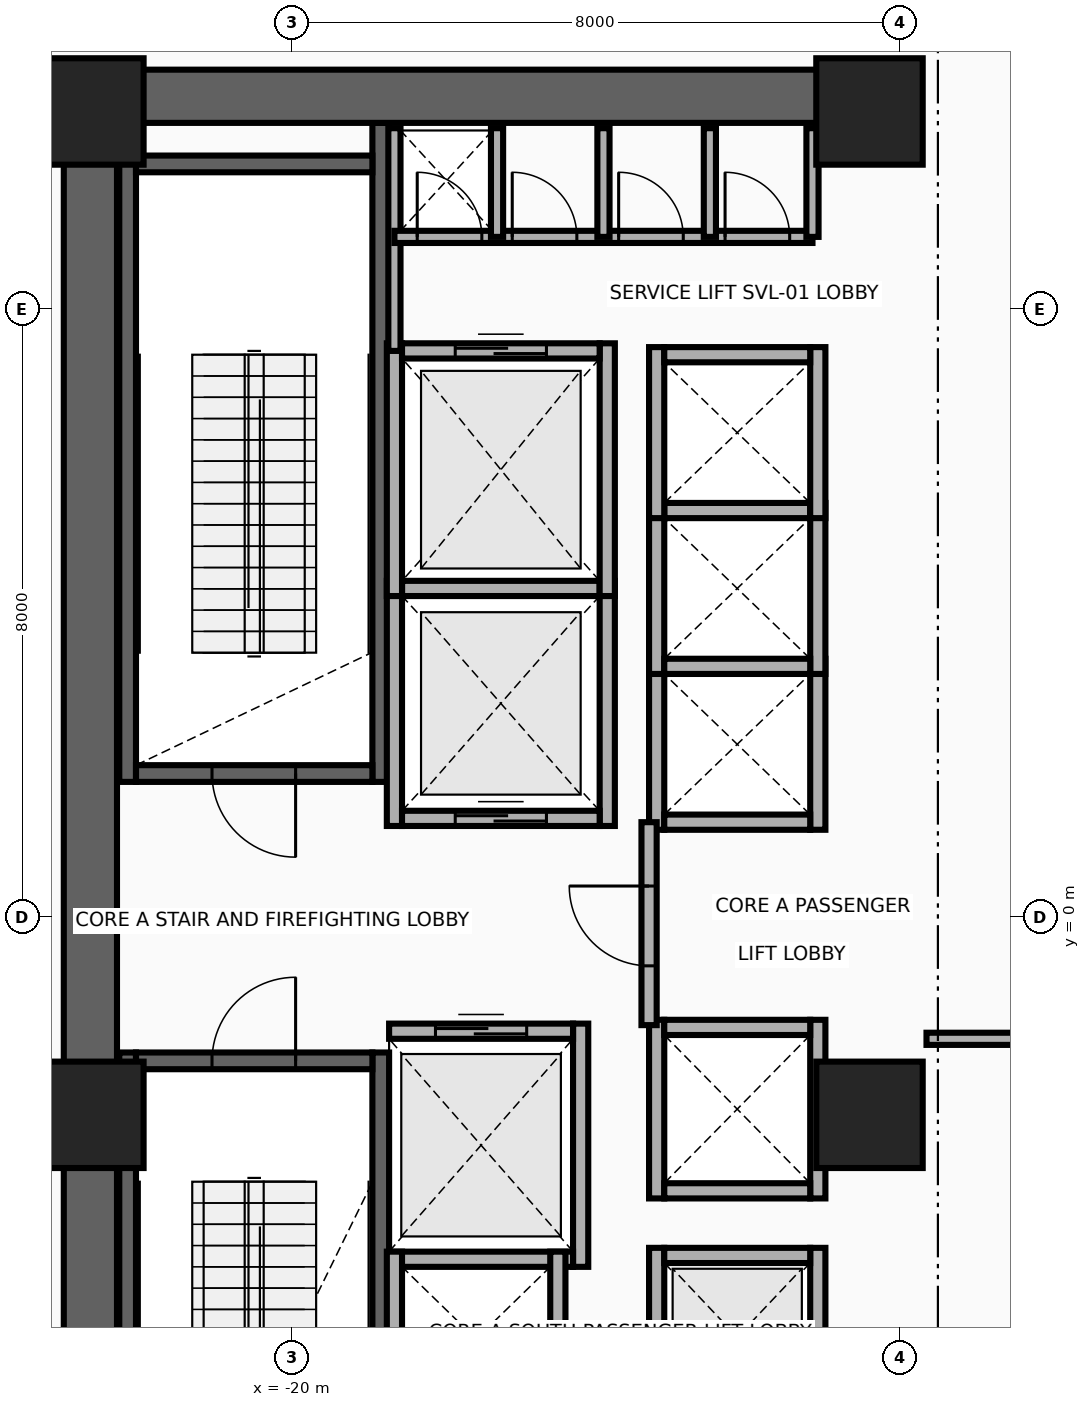
"""IFC4 building model, lengths in metres.
Left out: names, types, materials, properties, quantities, classifications, styles, units other than length and angle.
Written with IfcOpenShell. Run it as: python <this file> out.ifc"""

import sys

from ifc_helpers import new_model, si_unit, direction, frame, frame_2d, origin, origin_2d, place, context, subcontext, project, spatial, rectangle, extrude, source, transform, mapped, element, fill, save


model = new_model("IFC4")
c1 = context("Model", 3, precision=1e-05, world=origin(), true_north=direction((0.0, 1.0)))
c2 = subcontext(c1, "Body", "Model", "MODEL_VIEW")
j1 = project(units=[si_unit("LENGTHUNIT", "METRE"), si_unit("PLANEANGLEUNIT", "RADIAN")], contexts=[c1])
p1 = place(None, origin())
s1 = spatial("IfcSite", under=j1, at=p1, CompositionType="ELEMENT")
p2 = place(p1, origin())
s2 = spatial("IfcBuilding", under=s1, at=p2, CompositionType="ELEMENT")
p3 = place(p2, frame((0.0, 0.0, 15.6)))
s3 = spatial("IfcBuildingStorey", under=s2, at=p3, CompositionType="ELEMENT", Elevation=15.6)
for number, where, z_axis, x_axis in (
    (1, (-22.16, 1.78, 0.0), (0.0, 0.0, 1.0), (0.0, 1.0, 0.0)),
    (2, (-18.83, 1.78, 0.0), (0.0, 0.0, 1.0), (0.0, 1.0, 0.0)),
):
    element("IfcWall", number, at=place(p3, frame(where, z_axis=z_axis, x_axis=x_axis)), inside=s3, PredefinedType="SHEAR", context=c2, shape_type="SweptSolid", body=[
        extrude(rectangle(XDim=8.67, YDim=0.22, at=frame_2d((4.335, 0.0))), origin(), (0.0, 0.0, 1.0), 4.8),
    ])
p4 = place(p3, frame((-22.05, 1.89, 0.0), z_axis=(0.0, 0.0, 1.0), x_axis=(1.0, 0.0, 0.0)))
e3 = element("IfcWall", 3, at=p4, inside=s3, PredefinedType="SHEAR", context=c2, shape_type="SweptSolid", body=[
    extrude(rectangle(XDim=3.11, YDim=0.22, at=frame_2d((1.555, 0.0))), origin(), (0.0, 0.0, 1.0), 4.8),
])
p5 = place(p4, frame((1.0, 0.0, 0.0)))
e4 = element("IfcOpeningElement", 4, at=p5, cuts=e3, PredefinedType="OPENING", context=c2, shape_type="SweptSolid", body=[
    extrude(rectangle(XDim=1.1, YDim=2.15, at=frame_2d((0.55, 1.075))), frame((0.0, 0.125, 0.0), z_axis=(0.0, -1.0, 0.0), x_axis=(1.0, 0.0, 0.0)), (0.0, 0.0, 1.0), 0.25),
])
p6 = place(p3, frame((-22.05, 9.91, 0.0), z_axis=(0.0, 0.0, 1.0), x_axis=(1.0, 0.0, 0.0)))
e5 = element("IfcWall", 5, at=p6, inside=s3, PredefinedType="SHEAR", context=c2, shape_type="SweptSolid", body=[
    extrude(rectangle(XDim=3.11, YDim=0.22, at=frame_2d((1.555, 0.0))), origin(), (0.0, 0.0, 1.0), 4.8),
])
for number, where, z_axis, x_axis in (
    (6, (-22.16, -10.45, 0.0), (0.0, 0.0, 1.0), (0.0, 1.0, 0.0)),
    (7, (-18.83, -10.45, 0.0), (0.0, 0.0, 1.0), (0.0, 1.0, 0.0)),
):
    element("IfcWall", number, at=place(p3, frame(where, z_axis=z_axis, x_axis=x_axis)), inside=s3, PredefinedType="SHEAR", context=c2, shape_type="SweptSolid", body=[
        extrude(rectangle(XDim=8.67, YDim=0.22, at=frame_2d((4.335, 0.0))), origin(), (0.0, 0.0, 1.0), 4.8),
    ])
p7 = place(p3, frame((-22.05, -1.89, 0.0), z_axis=(0.0, 0.0, 1.0), x_axis=(1.0, 0.0, 0.0)))
e8 = element("IfcWall", 8, at=p7, inside=s3, PredefinedType="SHEAR", context=c2, shape_type="SweptSolid", body=[
    extrude(rectangle(XDim=3.11, YDim=0.22, at=frame_2d((1.555, 0.0))), origin(), (0.0, 0.0, 1.0), 4.8),
])
p8 = place(p7, frame((1.0, 0.0, 0.0)))
e9 = element("IfcOpeningElement", 9, at=p8, cuts=e8, PredefinedType="OPENING", context=c2, shape_type="SweptSolid", body=[
    extrude(rectangle(XDim=1.1, YDim=2.15, at=frame_2d((0.55, 1.075))), frame((0.0, 0.125, 0.0), z_axis=(0.0, -1.0, 0.0), x_axis=(1.0, 0.0, 0.0)), (0.0, 0.0, 1.0), 0.25),
])
p9 = place(p3, frame((-22.65, -11.15, 0.0), z_axis=(0.0, 0.0, 1.0), x_axis=(0.0, 1.0, 0.0)))
e10 = element("IfcWall", 10, at=p9, inside=s3, PredefinedType="SHEAR", context=c2, shape_type="SweptSolid", body=[
    extrude(rectangle(XDim=22.3, YDim=0.7, at=frame_2d((11.15, 0.0))), origin(), (0.0, 0.0, 1.0), 4.8),
])
p10 = place(p3, frame((-22.65, 10.8, 0.0), z_axis=(0.0, 0.0, 1.0), x_axis=(1.0, 0.0, 0.0)))
e11 = element("IfcWall", 11, at=p10, inside=s3, PredefinedType="SHEAR", context=c2, shape_type="SweptSolid", body=[
    extrude(rectangle(XDim=10.25, YDim=0.7, at=frame_2d((5.125, 0.0))), origin(), (0.0, 0.0, 1.0), 4.8),
])
m1 = source(origin(), c2, "Body", "SweptSolid", [
    extrude(rectangle(XDim=1.4, YDim=1.4, at=origin_2d()), origin(), (0.0, 0.0, 1.0), 5.2),
])
for number, where, z_axis, x_axis in (
    (12, (-22.65, -2.6, 0.0), (0.0, 0.0, 1.0), (1.0, 0.0, 0.0)),
    (13, (-12.4, -2.6, 0.0), (0.0, 0.0, 1.0), (1.0, 0.0, 0.0)),
    (14, (-22.65, 10.6, 0.0), (0.0, 0.0, 1.0), (1.0, 0.0, 0.0)),
    (15, (-12.4, 10.6, 0.0), (0.0, 0.0, 1.0), (1.0, 0.0, 0.0)),
):
    element("IfcColumn", number, at=place(p3, frame(where, z_axis=z_axis, x_axis=x_axis)), inside=s3, PredefinedType="COLUMN", context=c2, shape_type="MappedRepresentation", body=[
        mapped(m1, transform((0.0, 0.0, 0.0), x_axis=(1.0, 0.0, 0.0), y_axis=(0.0, 1.0, 0.0), z_axis=(0.0, 0.0, 1.0), scale=1.0)),
    ])
for number, where, z_axis, x_axis in (
    (16, (-18.65, 1.2, 0.0), (0.0, 0.0, 1.0), (0.0, 1.0, 0.0)),
    (17, (-15.85, 1.2, 0.0), (0.0, 0.0, 1.0), (0.0, 1.0, 0.0)),
):
    element("IfcWall", number, at=place(p3, frame(where, z_axis=z_axis, x_axis=x_axis)), inside=s3, PredefinedType="MOVABLE", context=c2, shape_type="SweptSolid", body=[
        extrude(rectangle(XDim=3.225, YDim=0.2, at=frame_2d((1.613, 0.0))), origin(), (0.0, 0.0, 1.0), 4.8),
    ])
p11 = place(p3, frame((-18.55, 1.3, 0.0), z_axis=(0.0, 0.0, 1.0), x_axis=(1.0, 0.0, 0.0)))
e18 = element("IfcWall", 18, at=p11, inside=s3, PredefinedType="MOVABLE", context=c2, shape_type="SweptSolid", body=[
    extrude(rectangle(XDim=2.6, YDim=0.2, at=frame_2d((1.3, 0.0))), origin(), (0.0, 0.0, 1.0), 4.8),
])
p12 = place(p11, frame((0.7, 0.0, 0.0)))
e19 = element("IfcOpeningElement", 19, at=p12, cuts=e18, PredefinedType="OPENING", context=c2, shape_type="SweptSolid", body=[
    extrude(rectangle(XDim=1.2, YDim=2.1, at=frame_2d((0.6, 1.05))), frame((0.0, 0.115, 0.0), z_axis=(0.0, -1.0, 0.0), x_axis=(1.0, 0.0, 0.0)), (0.0, 0.0, 1.0), 0.23),
])
p13 = place(p3, frame((-18.55, 4.325, 0.0), z_axis=(0.0, 0.0, 1.0), x_axis=(1.0, 0.0, 0.0)))
e20 = element("IfcWall", 20, at=p13, inside=s3, PredefinedType="MOVABLE", context=c2, shape_type="SweptSolid", body=[
    extrude(rectangle(XDim=2.6, YDim=0.2, at=frame_2d((1.3, 0.0))), origin(), (0.0, 0.0, 1.0), 4.8),
])
p14 = place(p3, frame((-16.2, -4.6, 0.0), z_axis=(0.0, 0.0, 1.0), x_axis=(0.0, 1.0, 0.0)))
e21 = element("IfcWall", 21, at=p14, inside=s3, PredefinedType="MOVABLE", context=c2, shape_type="SweptSolid", body=[
    extrude(rectangle(XDim=3.2, YDim=0.2, at=frame_2d((1.6, 0.0))), origin(), (0.0, 0.0, 1.0), 4.8),
])
p15 = place(p3, frame((-18.72, -4.5, 0.0), z_axis=(0.0, 0.0, 1.0), x_axis=(1.0, 0.0, 0.0)))
e22 = element("IfcWall", 22, at=p15, inside=s3, PredefinedType="MOVABLE", context=c2, shape_type="SweptSolid", body=[
    extrude(rectangle(XDim=2.42, YDim=0.2, at=frame_2d((1.21, 0.0))), origin(), (0.0, 0.0, 1.0), 4.8),
])
p16 = place(p3, frame((-18.72, -1.5, 0.0), z_axis=(0.0, 0.0, 1.0), x_axis=(1.0, 0.0, 0.0)))
e23 = element("IfcWall", 23, at=p16, inside=s3, PredefinedType="MOVABLE", context=c2, shape_type="SweptSolid", body=[
    extrude(rectangle(XDim=2.42, YDim=0.2, at=frame_2d((1.21, 0.0))), origin(), (0.0, 0.0, 1.0), 4.8),
])
p17 = place(p16, frame((0.61, 0.0, 0.0)))
e24 = element("IfcOpeningElement", 24, at=p17, cuts=e23, PredefinedType="OPENING", context=c2, shape_type="SweptSolid", body=[
    extrude(rectangle(XDim=1.2, YDim=2.1, at=frame_2d((0.6, 1.05))), frame((0.0, 0.115, 0.0), z_axis=(0.0, -1.0, 0.0), x_axis=(1.0, 0.0, 0.0)), (0.0, 0.0, 1.0), 0.23),
])
for number, where, z_axis, x_axis in (
    (25, (-18.65, 4.225, 0.0), (0.0, 0.0, 1.0), (0.0, 1.0, 0.0)),
    (26, (-15.85, 4.225, 0.0), (0.0, 0.0, 1.0), (0.0, 1.0, 0.0)),
):
    element("IfcWall", number, at=place(p3, frame(where, z_axis=z_axis, x_axis=x_axis)), inside=s3, PredefinedType="MOVABLE", context=c2, shape_type="SweptSolid", body=[
        extrude(rectangle(XDim=3.325, YDim=0.2, at=frame_2d((1.663, 0.0))), origin(), (0.0, 0.0, 1.0), 4.8),
    ])
p18 = place(p3, frame((-18.55, 7.45, 0.0), z_axis=(0.0, 0.0, 1.0), x_axis=(1.0, 0.0, 0.0)))
e27 = element("IfcWall", 27, at=p18, inside=s3, PredefinedType="MOVABLE", context=c2, shape_type="SweptSolid", body=[
    extrude(rectangle(XDim=2.6, YDim=0.2, at=frame_2d((1.3, 0.0))), origin(), (0.0, 0.0, 1.0), 4.8),
])
p19 = place(p18, frame((0.7, 0.0, 0.0)))
e28 = element("IfcOpeningElement", 28, at=p19, cuts=e27, PredefinedType="OPENING", context=c2, shape_type="SweptSolid", body=[
    extrude(rectangle(XDim=1.2, YDim=2.1, at=frame_2d((0.6, 1.05))), frame((0.0, 0.115, 0.0), z_axis=(0.0, -1.0, 0.0), x_axis=(1.0, 0.0, 0.0)), (0.0, 0.0, 1.0), 0.23),
])
for number, where, z_axis, x_axis in (
    (29, (-15.2, -6.7, 0.0), (0.0, 0.0, 1.0), (0.0, 1.0, 0.0)),
    (30, (-13.08, -6.7, 0.0), (0.0, 0.0, 1.0), (0.0, 1.0, 0.0)),
):
    element("IfcWall", number, at=place(p3, frame(where, z_axis=z_axis, x_axis=x_axis)), inside=s3, PredefinedType="MOVABLE", context=c2, shape_type="SweptSolid", body=[
        extrude(rectangle(XDim=2.35, YDim=0.2, at=frame_2d((1.175, 0.0))), origin(), (0.0, 0.0, 1.0), 4.8),
    ])
p20 = place(p3, frame((-15.1, -4.45, 0.0), z_axis=(0.0, 0.0, 1.0), x_axis=(1.0, 0.0, 0.0)))
e31 = element("IfcWall", 31, at=p20, inside=s3, PredefinedType="MOVABLE", context=c2, shape_type="SweptSolid", body=[
    extrude(rectangle(XDim=1.92, YDim=0.2, at=frame_2d((0.96, 0.0))), origin(), (0.0, 0.0, 1.0), 4.8),
])
for number, where, z_axis, x_axis in (
    (32, (-15.2, 1.15, 0.0), (0.0, 0.0, 1.0), (0.0, 1.0, 0.0)),
    (33, (-13.08, 1.15, 0.0), (0.0, 0.0, 1.0), (0.0, 1.0, 0.0)),
):
    element("IfcWall", number, at=place(p3, frame(where, z_axis=z_axis, x_axis=x_axis)), inside=s3, PredefinedType="MOVABLE", context=c2, shape_type="SweptSolid", body=[
        extrude(rectangle(XDim=2.25, YDim=0.2, at=frame_2d((1.125, 0.0))), origin(), (0.0, 0.0, 1.0), 4.8),
    ])
p21 = place(p3, frame((-15.1, 1.25, 0.0), z_axis=(0.0, 0.0, 1.0), x_axis=(1.0, 0.0, 0.0)))
e34 = element("IfcWall", 34, at=p21, inside=s3, PredefinedType="MOVABLE", context=c2, shape_type="SweptSolid", body=[
    extrude(rectangle(XDim=1.92, YDim=0.2, at=frame_2d((0.96, 0.0))), origin(), (0.0, 0.0, 1.0), 4.8),
])
for number, where, z_axis, x_axis in (
    (35, (-15.2, 3.2, 0.0), (0.0, 0.0, 1.0), (0.0, 1.0, 0.0)),
    (36, (-13.08, 3.2, 0.0), (0.0, 0.0, 1.0), (0.0, 1.0, 0.0)),
):
    element("IfcWall", number, at=place(p3, frame(where, z_axis=z_axis, x_axis=x_axis)), inside=s3, PredefinedType="MOVABLE", context=c2, shape_type="SweptSolid", body=[
        extrude(rectangle(XDim=2.25, YDim=0.2, at=frame_2d((1.125, 0.0))), origin(), (0.0, 0.0, 1.0), 4.8),
    ])
for number, where, z_axis, x_axis in (
    (37, (-15.1, 3.3, 0.0), (0.0, 0.0, 1.0), (1.0, 0.0, 0.0)),
    (38, (-15.1, 5.35, 0.0), (0.0, 0.0, 1.0), (1.0, 0.0, 0.0)),
):
    element("IfcWall", number, at=place(p3, frame(where, z_axis=z_axis, x_axis=x_axis)), inside=s3, PredefinedType="MOVABLE", context=c2, shape_type="SweptSolid", body=[
        extrude(rectangle(XDim=1.92, YDim=0.2, at=frame_2d((0.96, 0.0))), origin(), (0.0, 0.0, 1.0), 4.8),
    ])
for number, where, z_axis, x_axis in (
    (39, (-15.2, 5.25, 0.0), (0.0, 0.0, 1.0), (0.0, 1.0, 0.0)),
    (40, (-13.08, 5.25, 0.0), (0.0, 0.0, 1.0), (0.0, 1.0, 0.0)),
):
    element("IfcWall", number, at=place(p3, frame(where, z_axis=z_axis, x_axis=x_axis)), inside=s3, PredefinedType="MOVABLE", context=c2, shape_type="SweptSolid", body=[
        extrude(rectangle(XDim=2.25, YDim=0.2, at=frame_2d((1.125, 0.0))), origin(), (0.0, 0.0, 1.0), 4.8),
    ])
p22 = place(p3, frame((-15.1, 7.4, 0.0), z_axis=(0.0, 0.0, 1.0), x_axis=(1.0, 0.0, 0.0)))
e41 = element("IfcWall", 41, at=p22, inside=s3, PredefinedType="MOVABLE", context=c2, shape_type="SweptSolid", body=[
    extrude(rectangle(XDim=1.92, YDim=0.2, at=frame_2d((0.96, 0.0))), origin(), (0.0, 0.0, 1.0), 4.8),
])
for number, where, z_axis, x_axis in (
    (42, (-18.65, -6.7, 0.0), (0.0, 0.0, 1.0), (0.0, 1.0, 0.0)),
    (43, (-16.5, -6.7, 0.0), (0.0, 0.0, 1.0), (0.0, 1.0, 0.0)),
):
    element("IfcWall", number, at=place(p3, frame(where, z_axis=z_axis, x_axis=x_axis)), inside=s3, PredefinedType="MOVABLE", context=c2, shape_type="SweptSolid", body=[
        extrude(rectangle(XDim=2.3, YDim=0.2, at=frame_2d((1.15, 0.0))), origin(), (0.0, 0.0, 1.0), 4.8),
    ])
for number, where, z_axis, x_axis in (
    (44, (-15.2, -3.7, 0.0), (0.0, 0.0, 1.0), (0.0, 1.0, 0.0)),
    (45, (-13.08, -3.7, 0.0), (0.0, 0.0, 1.0), (0.0, 1.0, 0.0)),
):
    element("IfcWall", number, at=place(p3, frame(where, z_axis=z_axis, x_axis=x_axis)), inside=s3, PredefinedType="MOVABLE", context=c2, shape_type="SweptSolid", body=[
        extrude(rectangle(XDim=2.35, YDim=0.2, at=frame_2d((1.175, 0.0))), origin(), (0.0, 0.0, 1.0), 4.8),
    ])
for number, where, z_axis, x_axis in (
    (46, (-15.1, -3.6, 0.0), (0.0, 0.0, 1.0), (1.0, 0.0, 0.0)),
    (47, (-15.1, -1.45, 0.0), (0.0, 0.0, 1.0), (1.0, 0.0, 0.0)),
):
    element("IfcWall", number, at=place(p3, frame(where, z_axis=z_axis, x_axis=x_axis)), inside=s3, PredefinedType="MOVABLE", context=c2, shape_type="SweptSolid", body=[
        extrude(rectangle(XDim=1.92, YDim=0.2, at=frame_2d((0.96, 0.0))), origin(), (0.0, 0.0, 1.0), 4.8),
    ])
p23 = place(p3, frame((-15.3, -1.42, 0.0), z_axis=(0.0, 0.0, 1.0), x_axis=(0.0, 1.0, 0.0)))
e48 = element("IfcWall", 48, at=p23, inside=s3, PredefinedType="PARTITIONING", context=c2, shape_type="SweptSolid", body=[
    extrude(rectangle(XDim=2.67, YDim=0.2, at=frame_2d((1.335, 0.0))), origin(), (0.0, 0.0, 1.0), 4.8),
])
p24 = place(p23, frame((0.78, 0.0, 0.0)))
e49 = element("IfcOpeningElement", 49, at=p24, cuts=e48, PredefinedType="OPENING", context=c2, shape_type="SweptSolid", body=[
    extrude(rectangle(XDim=1.05, YDim=2.15, at=frame_2d((0.525, 1.075))), frame((0.0, 0.115, 0.0), z_axis=(0.0, -1.0, 0.0), x_axis=(1.0, 0.0, 0.0)), (0.0, 0.0, 1.0), 0.23),
])
p25 = place(p3, frame((-18.65, 7.45, 0.0), z_axis=(0.0, 0.0, 1.0), x_axis=(0.0, 1.0, 0.0)))
e50 = element("IfcWall", 50, at=p25, inside=s3, PredefinedType="PARTITIONING", context=c2, shape_type="SweptSolid", body=[
    extrude(rectangle(XDim=2.93, YDim=0.16, at=frame_2d((1.465, 0.0))), origin(), (0.0, 0.0, 1.0), 3.585),
])
p26 = place(p3, frame((-18.65, 8.95, 0.0), z_axis=(0.0, 0.0, 1.0), x_axis=(1.0, 0.0, 0.0)))
e51 = element("IfcWall", 51, at=p26, inside=s3, PredefinedType="PARTITIONING", context=c2, shape_type="SweptSolid", body=[
    extrude(rectangle(XDim=5.5, YDim=0.16, at=frame_2d((2.75, 0.0))), origin(), (0.0, 0.0, 1.0), 4.8),
])
p27 = place(p26, frame((0.3, 0.0, 0.0)))
e52 = element("IfcOpeningElement", 52, at=p27, cuts=e51, PredefinedType="OPENING", context=c2, shape_type="SweptSolid", body=[
    extrude(rectangle(XDim=0.85, YDim=2.05, at=frame_2d((0.425, 1.025))), frame((0.0, 0.095, 0.0), z_axis=(0.0, -1.0, 0.0), x_axis=(1.0, 0.0, 0.0)), (0.0, 0.0, 1.0), 0.19),
])
p28 = place(p26, frame((1.55, 0.0, 0.0)))
e53 = element("IfcOpeningElement", 53, at=p28, cuts=e51, PredefinedType="OPENING", context=c2, shape_type="SweptSolid", body=[
    extrude(rectangle(XDim=0.85, YDim=2.05, at=frame_2d((0.425, 1.025))), frame((0.0, 0.095, 0.0), z_axis=(0.0, -1.0, 0.0), x_axis=(1.0, 0.0, 0.0)), (0.0, 0.0, 1.0), 0.19),
])
p29 = place(p26, frame((2.95, 0.0, 0.0)))
e54 = element("IfcOpeningElement", 54, at=p29, cuts=e51, PredefinedType="OPENING", context=c2, shape_type="SweptSolid", body=[
    extrude(rectangle(XDim=0.85, YDim=2.05, at=frame_2d((0.425, 1.025))), frame((0.0, 0.095, 0.0), z_axis=(0.0, -1.0, 0.0), x_axis=(1.0, 0.0, 0.0)), (0.0, 0.0, 1.0), 0.19),
])
p30 = place(p26, frame((4.35, 0.0, 0.0)))
e55 = element("IfcOpeningElement", 55, at=p30, cuts=e51, PredefinedType="OPENING", context=c2, shape_type="SweptSolid", body=[
    extrude(rectangle(XDim=0.85, YDim=2.05, at=frame_2d((0.425, 1.025))), frame((0.0, 0.095, 0.0), z_axis=(0.0, -1.0, 0.0), x_axis=(1.0, 0.0, 0.0)), (0.0, 0.0, 1.0), 0.19),
])
for number, where, z_axis, x_axis in (
    (56, (-13.15, 8.95, 0.0), (0.0, 0.0, 1.0), (0.0, 1.0, 0.0)),
    (57, (-17.3, 8.95, 0.0), (0.0, 0.0, 1.0), (0.0, 1.0, 0.0)),
    (58, (-15.9, 8.95, 0.0), (0.0, 0.0, 1.0), (0.0, 1.0, 0.0)),
    (59, (-14.5, 8.95, 0.0), (0.0, 0.0, 1.0), (0.0, 1.0, 0.0)),
):
    element("IfcWall", number, at=place(p3, frame(where, z_axis=z_axis, x_axis=x_axis)), inside=s3, PredefinedType="PARTITIONING", context=c2, shape_type="SweptSolid", body=[
        extrude(rectangle(XDim=1.43, YDim=0.16, at=frame_2d((0.715, 0.0))), origin(), (0.0, 0.0, 1.0), 3.585),
    ])
p31 = place(p3, frame((-11.65, -1.6, 0.0), z_axis=(0.0, 0.0, 1.0), x_axis=(1.0, 0.0, 0.0)))
e60 = element("IfcWall", 60, at=p31, inside=s3, PredefinedType="PARTITIONING", context=c2, shape_type="SweptSolid", body=[
    extrude(rectangle(XDim=1.85, YDim=0.16, at=frame_2d((0.925, 0.0))), origin(), (0.0, 0.0, 1.0), 4.8),
])
p32 = place(p12, origin())
e61 = element("IfcDoor", 61, at=p32, inside=s3, OperationType="DOUBLE_DOOR_SLIDING", PredefinedType="DOOR", context=c2, shape_type="SweptSolid", body=[
    extrude(rectangle(XDim=1.2, YDim=2.1, at=frame_2d((0.6, 1.05))), frame((0.0, 0.025, 0.0), z_axis=(0.0, -1.0, 0.0), x_axis=(1.0, 0.0, 0.0)), (0.0, 0.0, 1.0), 0.05),
])
fill(e19, e61)
p33 = place(p17, origin())
e62 = element("IfcDoor", 62, at=p33, inside=s3, OperationType="DOUBLE_DOOR_SLIDING", PredefinedType="DOOR", context=c2, shape_type="SweptSolid", body=[
    extrude(rectangle(XDim=1.2, YDim=2.1, at=frame_2d((0.6, 1.05))), frame((0.0, 0.025, 0.0), z_axis=(0.0, -1.0, 0.0), x_axis=(1.0, 0.0, 0.0)), (0.0, 0.0, 1.0), 0.05),
])
fill(e24, e62)
p34 = place(p19, origin())
e63 = element("IfcDoor", 63, at=p34, inside=s3, OperationType="DOUBLE_DOOR_SLIDING", PredefinedType="DOOR", context=c2, shape_type="SweptSolid", body=[
    extrude(rectangle(XDim=1.2, YDim=2.1, at=frame_2d((0.6, 1.05))), frame((0.0, 0.025, 0.0), z_axis=(0.0, -1.0, 0.0), x_axis=(1.0, 0.0, 0.0)), (0.0, 0.0, 1.0), 0.05),
])
fill(e28, e63)
p35 = place(p24, origin())
e64 = element("IfcDoor", 64, at=p35, inside=s3, OperationType="SINGLE_SWING_RIGHT", PredefinedType="DOOR", context=c2, shape_type="SweptSolid", body=[
    extrude(rectangle(XDim=1.05, YDim=2.15, at=frame_2d((0.525, 1.075))), frame((0.0, 0.025, 0.0), z_axis=(0.0, -1.0, 0.0), x_axis=(1.0, 0.0, 0.0)), (0.0, 0.0, 1.0), 0.05),
])
fill(e49, e64)
p36 = place(p5, frame((1.1, 0.0, 0.0), z_axis=(0.0, 0.0, 1.0), x_axis=(-1.0, 0.0, 0.0)))
e65 = element("IfcDoor", 65, at=p36, inside=s3, OperationType="SINGLE_SWING_LEFT", PredefinedType="DOOR", context=c2, shape_type="SweptSolid", body=[
    extrude(rectangle(XDim=1.1, YDim=2.15, at=frame_2d((0.55, 1.075))), frame((0.0, 0.025, 0.0), z_axis=(0.0, -1.0, 0.0), x_axis=(1.0, 0.0, 0.0)), (0.0, 0.0, 1.0), 0.05),
])
fill(e4, e65)
p37 = place(p8, origin())
e66 = element("IfcDoor", 66, at=p37, inside=s3, OperationType="SINGLE_SWING_RIGHT", PredefinedType="DOOR", context=c2, shape_type="SweptSolid", body=[
    extrude(rectangle(XDim=1.1, YDim=2.15, at=frame_2d((0.55, 1.075))), frame((0.0, 0.025, 0.0), z_axis=(0.0, -1.0, 0.0), x_axis=(1.0, 0.0, 0.0)), (0.0, 0.0, 1.0), 0.05),
])
fill(e9, e66)
p38 = place(p27, origin())
e67 = element("IfcDoor", 67, at=p38, inside=s3, OperationType="SINGLE_SWING_LEFT", PredefinedType="DOOR", context=c2, shape_type="SweptSolid", body=[
    extrude(rectangle(XDim=0.85, YDim=2.05, at=frame_2d((0.425, 1.025))), frame((0.0, 0.025, 0.0), z_axis=(0.0, -1.0, 0.0), x_axis=(1.0, 0.0, 0.0)), (0.0, 0.0, 1.0), 0.05),
])
fill(e52, e67)
p39 = place(p28, origin())
e68 = element("IfcDoor", 68, at=p39, inside=s3, OperationType="SINGLE_SWING_RIGHT", PredefinedType="DOOR", context=c2, shape_type="SweptSolid", body=[
    extrude(rectangle(XDim=0.85, YDim=2.05, at=frame_2d((0.425, 1.025))), frame((0.0, 0.025, 0.0), z_axis=(0.0, -1.0, 0.0), x_axis=(1.0, 0.0, 0.0)), (0.0, 0.0, 1.0), 0.05),
])
fill(e53, e68)
p40 = place(p29, origin())
e69 = element("IfcDoor", 69, at=p40, inside=s3, OperationType="SINGLE_SWING_LEFT", PredefinedType="DOOR", context=c2, shape_type="SweptSolid", body=[
    extrude(rectangle(XDim=0.85, YDim=2.05, at=frame_2d((0.425, 1.025))), frame((0.0, 0.025, 0.0), z_axis=(0.0, -1.0, 0.0), x_axis=(1.0, 0.0, 0.0)), (0.0, 0.0, 1.0), 0.05),
])
fill(e54, e69)
p41 = place(p30, origin())
e70 = element("IfcDoor", 70, at=p41, inside=s3, OperationType="SINGLE_SWING_RIGHT", PredefinedType="DOOR", context=c2, shape_type="SweptSolid", body=[
    extrude(rectangle(XDim=0.85, YDim=2.05, at=frame_2d((0.425, 1.025))), frame((0.0, 0.025, 0.0), z_axis=(0.0, -1.0, 0.0), x_axis=(1.0, 0.0, 0.0)), (0.0, 0.0, 1.0), 0.05),
])
fill(e55, e70)
save(model, sys.argv[1])
